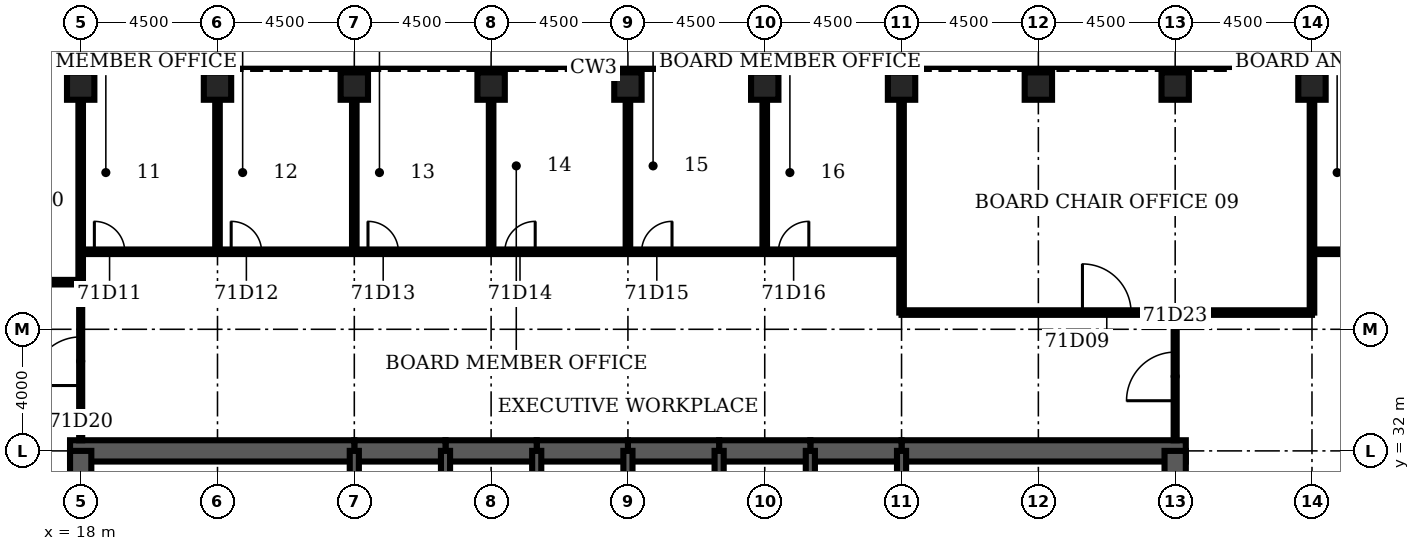
"""IFC4 building model, lengths in metres.
Left out: names, types, materials, properties, quantities, classifications, styles, units other than length and angle.
Written with IfcOpenShell. Run it as: python <this file> out.ifc"""

import sys

from ifc_helpers import new_model, si_unit, direction, frame, frame_2d, origin, origin_2d, place, context, subcontext, project, spatial, rectangle, hollow_rectangle, extrude, element, fill, save


model = new_model("IFC4")
c1 = context("Model", 3, precision=1e-05, world=origin(), true_north=direction((0.0, 1.0)))
c2 = subcontext(c1, "Body", "Model", "MODEL_VIEW")
j1 = project(units=[si_unit("LENGTHUNIT", "METRE"), si_unit("PLANEANGLEUNIT", "RADIAN")], contexts=[c1])
p1 = place(None, origin())
s1 = spatial("IfcSite", under=j1, at=p1, CompositionType="ELEMENT")
p2 = place(p1, origin())
s2 = spatial("IfcBuilding", under=s1, at=p2, CompositionType="ELEMENT")
p3 = place(p2, frame((0.0, 0.0, 313.1)))
s3 = spatial("IfcBuildingStorey", under=s2, at=p3, CompositionType="ELEMENT", Elevation=313.1)
for number, where, z_axis, x_axis in (
    (1, (58.5, 44.0, 0.0), (0.0, 0.0, 1.0), (0.0, 1.0, 0.0)),
    (2, (54.0, 44.0, 0.0), (0.0, 0.0, 1.0), (0.0, 1.0, 0.0)),
    (3, (49.5, 44.0, 0.0), (0.0, 0.0, 1.0), (0.0, 1.0, 0.0)),
    (4, (45.0, 44.0, 0.0), (0.0, 0.0, 1.0), (0.0, 1.0, 0.0)),
    (5, (40.5, 44.0, 0.0), (0.0, 0.0, 1.0), (0.0, 1.0, 0.0)),
    (6, (36.0, 44.0, 0.0), (0.0, 0.0, 1.0), (0.0, 1.0, 0.0)),
    (7, (31.5, 44.0, 0.0), (0.0, 0.0, 1.0), (0.0, 1.0, 0.0)),
    (8, (27.0, 44.0, 0.0), (0.0, 0.0, 1.0), (0.0, 1.0, 0.0)),
    (9, (22.5, 44.0, 0.0), (0.0, 0.0, 1.0), (0.0, 1.0, 0.0)),
    (10, (18.0, 44.0, 0.0), (0.0, 0.0, 1.0), (0.0, 1.0, 0.0)),
):
    element("IfcColumn", number, at=place(p3, frame(where, z_axis=z_axis, x_axis=x_axis)), inside=s3, PredefinedType="COLUMN", context=c2, shape_type="SweptSolid", body=[
        extrude(hollow_rectangle(XDim=0.9, YDim=0.9, WallThickness=0.05, at=origin_2d()), origin(), (0.0, 0.0, 1.0), 4.2),
    ])
p4 = place(p3, frame((54.35, 32.0, 0.0), z_axis=(0.0, 0.0, 1.0), x_axis=(-1.0, 0.0, 0.0)))
e11 = element("IfcWall", 11, at=p4, inside=s3, PredefinedType="SHEAR", context=c2, shape_type="SweptSolid", body=[
    extrude(rectangle(XDim=9.35, YDim=0.7, at=frame_2d((4.675, 0.0))), origin(), (0.0, 0.0, 1.0), 4.2),
])
for number, where, z_axis, x_axis in (
    (12, (45.0, 32.0, 0.0), (0.0, 0.0, 1.0), (-1.0, 0.0, 0.0)),
    (13, (42.0, 32.0, 0.0), (0.0, 0.0, 1.0), (-1.0, 0.0, 0.0)),
    (14, (39.0, 32.0, 0.0), (0.0, 0.0, 1.0), (-1.0, 0.0, 0.0)),
    (15, (36.0, 32.0, 0.0), (0.0, 0.0, 1.0), (-1.0, 0.0, 0.0)),
    (16, (33.0, 32.0, 0.0), (0.0, 0.0, 1.0), (-1.0, 0.0, 0.0)),
    (17, (30.0, 32.0, 0.0), (0.0, 0.0, 1.0), (-1.0, 0.0, 0.0)),
):
    element("IfcWall", number, at=place(p3, frame(where, z_axis=z_axis, x_axis=x_axis)), inside=s3, PredefinedType="SHEAR", context=c2, shape_type="SweptSolid", body=[
        extrude(rectangle(XDim=3.0, YDim=0.7, at=frame_2d((1.5, 0.0))), origin(), (0.0, 0.0, 1.0), 4.2),
    ])
p5 = place(p3, frame((27.0, 32.0, 0.0), z_axis=(0.0, 0.0, 1.0), x_axis=(-1.0, 0.0, 0.0)))
e18 = element("IfcWall", 18, at=p5, inside=s3, PredefinedType="SHEAR", context=c2, shape_type="SweptSolid", body=[
    extrude(rectangle(XDim=9.35, YDim=0.7, at=frame_2d((4.675, 0.0))), origin(), (0.0, 0.0, 1.0), 4.2),
])
for number, where, z_axis, x_axis in (
    (19, (18.0, 32.0, 0.0), (0.0, 0.0, 1.0), (0.0, -1.0, 0.0)),
    (20, (54.0, 28.8, 0.0), (0.0, 0.0, 1.0), (0.0, 1.0, 0.0)),
):
    element("IfcWall", number, at=place(p3, frame(where, z_axis=z_axis, x_axis=x_axis)), inside=s3, PredefinedType="SHEAR", context=c2, shape_type="SweptSolid", body=[
        extrude(rectangle(XDim=3.2, YDim=0.7, at=frame_2d((1.6, 0.0))), origin(), (0.0, 0.0, 1.0), 4.2),
    ])
for number, where, z_axis, x_axis in (
    (21, (27.0, 28.8, 0.0), (0.0, 0.0, 1.0), (0.0, 1.0, 0.0)),
    (22, (30.0, 28.8, 0.0), (0.0, 0.0, 1.0), (0.0, 1.0, 0.0)),
    (23, (33.0, 28.8, 0.0), (0.0, 0.0, 1.0), (0.0, 1.0, 0.0)),
    (24, (36.0, 28.8, 0.0), (0.0, 0.0, 1.0), (0.0, 1.0, 0.0)),
    (25, (39.0, 28.8, 0.0), (0.0, 0.0, 1.0), (0.0, 1.0, 0.0)),
    (26, (42.0, 28.8, 0.0), (0.0, 0.0, 1.0), (0.0, 1.0, 0.0)),
    (27, (45.0, 28.8, 0.0), (0.0, 0.0, 1.0), (0.0, 1.0, 0.0)),
):
    element("IfcWall", number, at=place(p3, frame(where, z_axis=z_axis, x_axis=x_axis)), inside=s3, PredefinedType="SOLIDWALL", context=c2, shape_type="SweptSolid", body=[
        extrude(rectangle(XDim=3.2, YDim=0.3, at=frame_2d((1.6, 0.0))), origin(), (0.0, 0.0, 1.0), 4.2),
    ])
p6 = place(p3, frame((45.0, 36.55, 0.0), z_axis=(0.0, 0.0, 1.0), x_axis=(1.0, 0.0, 0.0)))
e28 = element("IfcWall", 28, at=p6, inside=s3, PredefinedType="PARTITIONING", context=c2, shape_type="SweptSolid", body=[
    extrude(rectangle(XDim=13.5, YDim=0.15, at=frame_2d((6.75, 0.0))), origin(), (0.0, 0.0, 1.0), 3.0),
])
p7 = place(p6, frame((5.95, 0.0, 0.0)))
e29 = element("IfcOpeningElement", 29, at=p7, cuts=e28, PredefinedType="OPENING", context=c2, shape_type="SweptSolid", body=[
    extrude(rectangle(XDim=1.6, YDim=2.1, at=frame_2d((0.8, 1.05))), frame((0.0, 0.085, 0.0), z_axis=(0.0, -1.0, 0.0), x_axis=(1.0, 0.0, 0.0)), (0.0, 0.0, 1.0), 0.17),
])
p8 = place(p3, frame((9.0, 37.55, 0.0), z_axis=(0.0, 0.0, 1.0), x_axis=(1.0, 0.0, 0.0)))
e30 = element("IfcWall", 30, at=p8, inside=s3, PredefinedType="PARTITIONING", context=c2, shape_type="SweptSolid", body=[
    extrude(rectangle(XDim=9.0, YDim=0.15, at=frame_2d((4.5, 0.0))), origin(), (0.0, 0.0, 1.0), 3.0),
])
p9 = place(p8, frame((4.0, 0.0, 0.0)))
e31 = element("IfcOpeningElement", 31, at=p9, cuts=e30, PredefinedType="OPENING", context=c2, shape_type="SweptSolid", body=[
    extrude(rectangle(XDim=1.0, YDim=2.1, at=frame_2d((0.5, 1.05))), frame((0.0, 0.085, 0.0), z_axis=(0.0, -1.0, 0.0), x_axis=(1.0, 0.0, 0.0)), (0.0, 0.0, 1.0), 0.17),
])
p10 = place(p3, frame((18.0, 38.55, 0.0), z_axis=(0.0, 0.0, 1.0), x_axis=(1.0, 0.0, 0.0)))
e32 = element("IfcWall", 32, at=p10, inside=s3, PredefinedType="PARTITIONING", context=c2, shape_type="SweptSolid", body=[
    extrude(rectangle(XDim=27.0, YDim=0.15, at=frame_2d((13.5, 0.0))), origin(), (0.0, 0.0, 1.0), 3.0),
])
p11 = place(p10, frame((0.45, 0.0, 0.0)))
e33 = element("IfcOpeningElement", 33, at=p11, cuts=e32, PredefinedType="OPENING", context=c2, shape_type="SweptSolid", body=[
    extrude(rectangle(XDim=1.0, YDim=2.1, at=frame_2d((0.5, 1.05))), frame((0.0, 0.085, 0.0), z_axis=(0.0, -1.0, 0.0), x_axis=(1.0, 0.0, 0.0)), (0.0, 0.0, 1.0), 0.17),
])
p12 = place(p10, frame((4.95, 0.0, 0.0)))
e34 = element("IfcOpeningElement", 34, at=p12, cuts=e32, PredefinedType="OPENING", context=c2, shape_type="SweptSolid", body=[
    extrude(rectangle(XDim=1.0, YDim=2.1, at=frame_2d((0.5, 1.05))), frame((0.0, 0.085, 0.0), z_axis=(0.0, -1.0, 0.0), x_axis=(1.0, 0.0, 0.0)), (0.0, 0.0, 1.0), 0.17),
])
p13 = place(p10, frame((9.45, 0.0, 0.0)))
e35 = element("IfcOpeningElement", 35, at=p13, cuts=e32, PredefinedType="OPENING", context=c2, shape_type="SweptSolid", body=[
    extrude(rectangle(XDim=1.0, YDim=2.1, at=frame_2d((0.5, 1.05))), frame((0.0, 0.085, 0.0), z_axis=(0.0, -1.0, 0.0), x_axis=(1.0, 0.0, 0.0)), (0.0, 0.0, 1.0), 0.17),
])
p14 = place(p10, frame((13.95, 0.0, 0.0)))
e36 = element("IfcOpeningElement", 36, at=p14, cuts=e32, PredefinedType="OPENING", context=c2, shape_type="SweptSolid", body=[
    extrude(rectangle(XDim=1.0, YDim=2.1, at=frame_2d((0.5, 1.05))), frame((0.0, 0.085, 0.0), z_axis=(0.0, -1.0, 0.0), x_axis=(1.0, 0.0, 0.0)), (0.0, 0.0, 1.0), 0.17),
])
p15 = place(p10, frame((18.45, 0.0, 0.0)))
e37 = element("IfcOpeningElement", 37, at=p15, cuts=e32, PredefinedType="OPENING", context=c2, shape_type="SweptSolid", body=[
    extrude(rectangle(XDim=1.0, YDim=2.1, at=frame_2d((0.5, 1.05))), frame((0.0, 0.085, 0.0), z_axis=(0.0, -1.0, 0.0), x_axis=(1.0, 0.0, 0.0)), (0.0, 0.0, 1.0), 0.17),
])
p16 = place(p10, frame((22.95, 0.0, 0.0)))
e38 = element("IfcOpeningElement", 38, at=p16, cuts=e32, PredefinedType="OPENING", context=c2, shape_type="SweptSolid", body=[
    extrude(rectangle(XDim=1.0, YDim=2.1, at=frame_2d((0.5, 1.05))), frame((0.0, 0.085, 0.0), z_axis=(0.0, -1.0, 0.0), x_axis=(1.0, 0.0, 0.0)), (0.0, 0.0, 1.0), 0.17),
])
p17 = place(p3, frame((58.5, 38.55, 0.0), z_axis=(0.0, 0.0, 1.0), x_axis=(1.0, 0.0, 0.0)))
e39 = element("IfcWall", 39, at=p17, inside=s3, PredefinedType="PARTITIONING", context=c2, shape_type="SweptSolid", body=[
    extrude(rectangle(XDim=4.5, YDim=0.15, at=frame_2d((2.25, 0.0))), origin(), (0.0, 0.0, 1.0), 3.0),
])
p18 = place(p17, frame((1.75, 0.0, 0.0)))
e40 = element("IfcOpeningElement", 40, at=p18, cuts=e39, PredefinedType="OPENING", context=c2, shape_type="SweptSolid", body=[
    extrude(rectangle(XDim=1.0, YDim=2.1, at=frame_2d((0.5, 1.05))), frame((0.0, 0.085, 0.0), z_axis=(0.0, -1.0, 0.0), x_axis=(1.0, 0.0, 0.0)), (0.0, 0.0, 1.0), 0.17),
])
p19 = place(p3, frame((18.0, 32.35, 0.0), z_axis=(0.0, 0.0, 1.0), x_axis=(0.0, 1.0, 0.0)))
e41 = element("IfcWall", 41, at=p19, inside=s3, PredefinedType="PARTITIONING", context=c2, shape_type="SweptSolid", body=[
    extrude(rectangle(XDim=5.2, YDim=0.1, at=frame_2d((2.6, 0.0))), origin(), (0.0, 0.0, 1.0), 3.0),
])
p20 = place(p19, frame((1.8, 0.0, 0.0)))
e42 = element("IfcOpeningElement", 42, at=p20, cuts=e41, PredefinedType="OPENING", context=c2, shape_type="SweptSolid", body=[
    extrude(rectangle(XDim=1.6, YDim=2.1, at=frame_2d((0.8, 1.05))), frame((0.0, 0.06, 0.0), z_axis=(0.0, -1.0, 0.0), x_axis=(1.0, 0.0, 0.0)), (0.0, 0.0, 1.0), 0.12),
])
p21 = place(p3, frame((18.0, 37.55, 0.0), z_axis=(0.0, 0.0, 1.0), x_axis=(0.0, 1.0, 0.0)))
e43 = element("IfcWall", 43, at=p21, inside=s3, PredefinedType="PARTITIONING", context=c2, shape_type="SweptSolid", body=[
    extrude(rectangle(XDim=6.0, YDim=0.15, at=frame_2d((3.0, 0.0))), origin(), (0.0, 0.0, 1.0), 3.0),
])
for number, where, z_axis, x_axis in (
    (44, (22.5, 38.55, 0.0), (0.0, 0.0, 1.0), (0.0, 1.0, 0.0)),
    (45, (27.0, 38.55, 0.0), (0.0, 0.0, 1.0), (0.0, 1.0, 0.0)),
    (46, (31.5, 38.55, 0.0), (0.0, 0.0, 1.0), (0.0, 1.0, 0.0)),
    (47, (36.0, 38.55, 0.0), (0.0, 0.0, 1.0), (0.0, 1.0, 0.0)),
    (48, (40.5, 38.55, 0.0), (0.0, 0.0, 1.0), (0.0, 1.0, 0.0)),
):
    element("IfcWall", number, at=place(p3, frame(where, z_axis=z_axis, x_axis=x_axis)), inside=s3, PredefinedType="PARTITIONING", context=c2, shape_type="SweptSolid", body=[
        extrude(rectangle(XDim=5.0, YDim=0.15, at=frame_2d((2.5, 0.0))), origin(), (0.0, 0.0, 1.0), 3.0),
    ])
p22 = place(p3, frame((45.0, 36.55, 0.0), z_axis=(0.0, 0.0, 1.0), x_axis=(0.0, 1.0, 0.0)))
e49 = element("IfcWall", 49, at=p22, inside=s3, PredefinedType="PARTITIONING", context=c2, shape_type="SweptSolid", body=[
    extrude(rectangle(XDim=7.0, YDim=0.15, at=frame_2d((3.5, 0.0))), origin(), (0.0, 0.0, 1.0), 3.0),
])
p23 = place(p3, frame((54.0, 32.35, 0.0), z_axis=(0.0, 0.0, 1.0), x_axis=(0.0, 1.0, 0.0)))
e50 = element("IfcWall", 50, at=p23, inside=s3, PredefinedType="PARTITIONING", context=c2, shape_type="SweptSolid", body=[
    extrude(rectangle(XDim=4.2, YDim=0.1, at=frame_2d((2.1, 0.0))), origin(), (0.0, 0.0, 1.0), 3.0),
])
p24 = place(p23, frame((1.3, 0.0, 0.0)))
e51 = element("IfcOpeningElement", 51, at=p24, cuts=e50, PredefinedType="OPENING", context=c2, shape_type="SweptSolid", body=[
    extrude(rectangle(XDim=1.6, YDim=2.1, at=frame_2d((0.8, 1.05))), frame((0.0, 0.06, 0.0), z_axis=(0.0, -1.0, 0.0), x_axis=(1.0, 0.0, 0.0)), (0.0, 0.0, 1.0), 0.12),
])
p25 = place(p3, frame((58.5, 36.55, 0.0), z_axis=(0.0, 0.0, 1.0), x_axis=(0.0, 1.0, 0.0)))
e52 = element("IfcWall", 52, at=p25, inside=s3, PredefinedType="PARTITIONING", context=c2, shape_type="SweptSolid", body=[
    extrude(rectangle(XDim=7.0, YDim=0.15, at=frame_2d((3.5, 0.0))), origin(), (0.0, 0.0, 1.0), 3.0),
])
p26 = place(p7, origin())
e53 = element("IfcDoor", 53, at=p26, inside=s3, OperationType="SINGLE_SWING_LEFT", PredefinedType="DOOR", context=c2, shape_type="SweptSolid", body=[
    extrude(rectangle(XDim=1.6, YDim=2.1, at=frame_2d((0.8, 1.05))), frame((0.0, 0.025, 0.0), z_axis=(0.0, -1.0, 0.0), x_axis=(1.0, 0.0, 0.0)), (0.0, 0.0, 1.0), 0.05),
])
fill(e29, e53)
p27 = place(p11, origin())
e54 = element("IfcDoor", 54, at=p27, inside=s3, OperationType="SINGLE_SWING_LEFT", PredefinedType="DOOR", context=c2, shape_type="SweptSolid", body=[
    extrude(rectangle(XDim=1.0, YDim=2.1, at=frame_2d((0.5, 1.05))), frame((0.0, 0.025, 0.0), z_axis=(0.0, -1.0, 0.0), x_axis=(1.0, 0.0, 0.0)), (0.0, 0.0, 1.0), 0.05),
])
fill(e33, e54)
p28 = place(p12, origin())
e55 = element("IfcDoor", 55, at=p28, inside=s3, OperationType="SINGLE_SWING_LEFT", PredefinedType="DOOR", context=c2, shape_type="SweptSolid", body=[
    extrude(rectangle(XDim=1.0, YDim=2.1, at=frame_2d((0.5, 1.05))), frame((0.0, 0.025, 0.0), z_axis=(0.0, -1.0, 0.0), x_axis=(1.0, 0.0, 0.0)), (0.0, 0.0, 1.0), 0.05),
])
fill(e34, e55)
p29 = place(p13, origin())
e56 = element("IfcDoor", 56, at=p29, inside=s3, OperationType="SINGLE_SWING_LEFT", PredefinedType="DOOR", context=c2, shape_type="SweptSolid", body=[
    extrude(rectangle(XDim=1.0, YDim=2.1, at=frame_2d((0.5, 1.05))), frame((0.0, 0.025, 0.0), z_axis=(0.0, -1.0, 0.0), x_axis=(1.0, 0.0, 0.0)), (0.0, 0.0, 1.0), 0.05),
])
fill(e35, e56)
p30 = place(p14, origin())
e57 = element("IfcDoor", 57, at=p30, inside=s3, OperationType="SINGLE_SWING_RIGHT", PredefinedType="DOOR", context=c2, shape_type="SweptSolid", body=[
    extrude(rectangle(XDim=1.0, YDim=2.1, at=frame_2d((0.5, 1.05))), frame((0.0, 0.025, 0.0), z_axis=(0.0, -1.0, 0.0), x_axis=(1.0, 0.0, 0.0)), (0.0, 0.0, 1.0), 0.05),
])
fill(e36, e57)
p31 = place(p15, origin())
e58 = element("IfcDoor", 58, at=p31, inside=s3, OperationType="SINGLE_SWING_RIGHT", PredefinedType="DOOR", context=c2, shape_type="SweptSolid", body=[
    extrude(rectangle(XDim=1.0, YDim=2.1, at=frame_2d((0.5, 1.05))), frame((0.0, 0.025, 0.0), z_axis=(0.0, -1.0, 0.0), x_axis=(1.0, 0.0, 0.0)), (0.0, 0.0, 1.0), 0.05),
])
fill(e37, e58)
p32 = place(p16, origin())
e59 = element("IfcDoor", 59, at=p32, inside=s3, OperationType="SINGLE_SWING_RIGHT", PredefinedType="DOOR", context=c2, shape_type="SweptSolid", body=[
    extrude(rectangle(XDim=1.0, YDim=2.1, at=frame_2d((0.5, 1.05))), frame((0.0, 0.025, 0.0), z_axis=(0.0, -1.0, 0.0), x_axis=(1.0, 0.0, 0.0)), (0.0, 0.0, 1.0), 0.05),
])
fill(e38, e59)
p33 = place(p20, origin())
e60 = element("IfcDoor", 60, at=p33, inside=s3, OperationType="SINGLE_SWING_LEFT", PredefinedType="DOOR", context=c2, shape_type="SweptSolid", body=[
    extrude(rectangle(XDim=1.6, YDim=2.1, at=frame_2d((0.8, 1.05))), frame((0.0, 0.025, 0.0), z_axis=(0.0, -1.0, 0.0), x_axis=(1.0, 0.0, 0.0)), (0.0, 0.0, 1.0), 0.05),
])
fill(e42, e60)
p34 = place(p24, origin())
e61 = element("IfcDoor", 61, at=p34, inside=s3, OperationType="SINGLE_SWING_LEFT", PredefinedType="DOOR", context=c2, shape_type="SweptSolid", body=[
    extrude(rectangle(XDim=1.6, YDim=2.1, at=frame_2d((0.8, 1.05))), frame((0.0, 0.025, 0.0), z_axis=(0.0, -1.0, 0.0), x_axis=(1.0, 0.0, 0.0)), (0.0, 0.0, 1.0), 0.05),
])
fill(e51, e61)
save(model, sys.argv[1])
